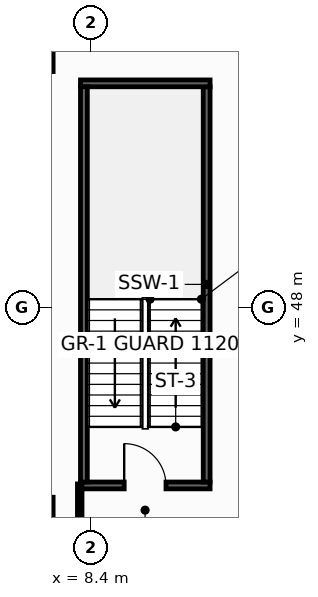
"""IFC4 building model, lengths in metres.
Left out: names, types, materials, properties, quantities, classifications, styles, units other than length and angle.
Written with IfcOpenShell. Run it as: python <this file> out.ifc"""

import sys

from ifc_helpers import new_model, si_unit, direction, frame, frame_2d, origin, origin_2d, place, context, subcontext, project, spatial, rectangle, hollow_rectangle, extrude, element, fill, save


model = new_model("IFC4")
c1 = context("Model", 3, precision=1e-05, world=origin(), true_north=direction((0.0, 1.0)))
c2 = subcontext(c1, "Body", "Model", "MODEL_VIEW")
j1 = project(units=[si_unit("LENGTHUNIT", "METRE"), si_unit("PLANEANGLEUNIT", "RADIAN")], contexts=[c1])
p1 = place(None, origin())
s1 = spatial("IfcSite", under=j1, at=p1, CompositionType="ELEMENT")
p2 = place(p1, origin())
s2 = spatial("IfcBuilding", under=s1, at=p2, CompositionType="ELEMENT")
p3 = place(p2, frame((0.0, 0.0, 92.8)))
s3 = spatial("IfcBuildingStorey", under=s2, at=p3, CompositionType="ELEMENT", Elevation=92.8)
for number, where, z_axis, x_axis in (
    (1, (6.8, 54.8, 0.0), (0.0, 0.0, 1.0), (1.0, 0.0, 0.0)),
    (2, (6.8, 42.4, 0.0), (0.0, 0.0, 1.0), (1.0, 0.0, 0.0)),
):
    element("IfcColumn", number, at=place(p3, frame(where, z_axis=z_axis, x_axis=x_axis)), inside=s3, PredefinedType="COLUMN", context=c2, shape_type="SweptSolid", body=[
        extrude(hollow_rectangle(XDim=1.2, YDim=1.2, WallThickness=0.055, at=origin_2d()), origin(), (0.0, 0.0, 1.0), 4.4),
    ])
p4 = place(p3, frame((8.12, 43.31, 0.0), z_axis=(0.0, 0.0, 1.0), x_axis=(1.0, 0.0, 0.0)))
e3 = element("IfcWall", 3, at=p4, inside=s3, PredefinedType="SHEAR", context=c2, shape_type="SweptSolid", body=[
    extrude(rectangle(XDim=3.41, YDim=0.18, at=frame_2d((1.705, 0.0))), origin(), (0.0, 0.0, 1.0), 4.15),
])
p5 = place(p4, frame((1.15, 0.0, 0.0)))
e4 = element("IfcOpeningElement", 4, at=p5, cuts=e3, PredefinedType="OPENING", context=c2, shape_type="SweptSolid", body=[
    extrude(rectangle(XDim=1.1, YDim=2.15, at=frame_2d((0.55, 1.075))), frame((0.0, 0.1, 0.0), z_axis=(0.0, -1.0, 0.0), x_axis=(1.0, 0.0, 0.0)), (0.0, 0.0, 1.0), 0.2),
])
p6 = place(p3, frame((11.44, 43.4, 0.0), z_axis=(0.0, 0.0, 1.0), x_axis=(0.0, 1.0, 0.0)))
e5 = element("IfcWall", 5, at=p6, inside=s3, PredefinedType="SHEAR", context=c2, shape_type="SweptSolid", body=[
    extrude(rectangle(XDim=10.4, YDim=0.18, at=frame_2d((5.2, 0.0))), origin(), (0.0, 0.0, 1.0), 4.15),
])
p7 = place(p3, frame((11.53, 53.89, 0.0), z_axis=(0.0, 0.0, 1.0), x_axis=(-1.0, 0.0, 0.0)))
e6 = element("IfcWall", 6, at=p7, inside=s3, PredefinedType="SHEAR", context=c2, shape_type="SweptSolid", body=[
    extrude(rectangle(XDim=3.41, YDim=0.18, at=frame_2d((1.705, 0.0))), origin(), (0.0, 0.0, 1.0), 4.15),
])
p8 = place(p3, frame((8.21, 53.8, 0.0), z_axis=(0.0, 0.0, 1.0), x_axis=(0.0, -1.0, 0.0)))
e7 = element("IfcWall", 7, at=p8, inside=s3, PredefinedType="SHEAR", context=c2, shape_type="SweptSolid", body=[
    extrude(rectangle(XDim=10.4, YDim=0.18, at=frame_2d((5.2, 0.0))), origin(), (0.0, 0.0, 1.0), 4.15),
])
p9 = place(p3, frame((8.1, 40.95, 0.0), z_axis=(0.0, 0.0, 1.0), x_axis=(0.0, 1.0, 0.0)))
e8 = element("IfcWall", 8, at=p9, inside=s3, PredefinedType="PARTITIONING", context=c2, shape_type="SweptSolid", body=[
    extrude(rectangle(XDim=2.4, YDim=0.12, at=frame_2d((1.2, 0.0))), origin(), (0.0, 0.0, 1.0), 3.335),
])
p10 = place(p5, origin())
e9 = element("IfcDoor", 9, at=p10, inside=s3, OperationType="SINGLE_SWING_LEFT", PredefinedType="DOOR", context=c2, shape_type="SweptSolid", body=[
    extrude(rectangle(XDim=1.1, YDim=2.15, at=frame_2d((0.55, 1.075))), frame((0.0, 0.025, 0.0), z_axis=(0.0, -1.0, 0.0), x_axis=(1.0, 0.0, 0.0)), (0.0, 0.0, 1.0), 0.05),
])
fill(e4, e9)
save(model, sys.argv[1])
